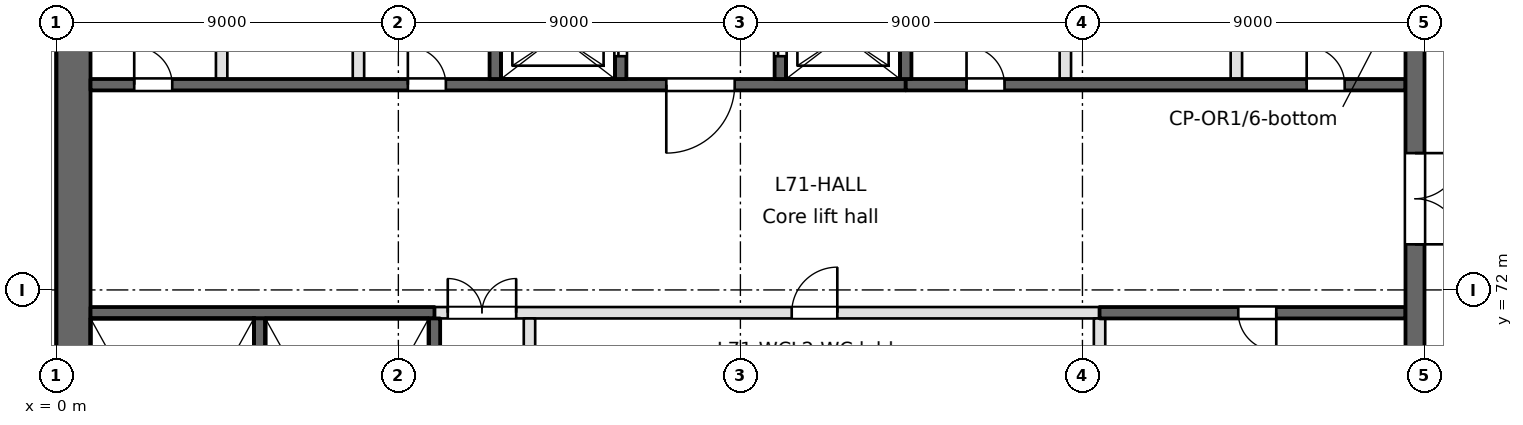
"""IFC4 building model, lengths in metres.
Left out: names, types, materials, properties, quantities, classifications, styles, units other than length and angle.
Written with IfcOpenShell. Run it as: python <this file> out.ifc"""

import sys

from ifc_helpers import new_model, si_unit, direction, frame, frame_2d, origin, place, context, subcontext, project, spatial, rectangle, extrude, element, fill, save


model = new_model("IFC4")
c1 = context("Model", 3, precision=1e-05, world=origin(), true_north=direction((0.0, 1.0)))
c2 = subcontext(c1, "Body", "Model", "MODEL_VIEW")
j1 = project(units=[si_unit("LENGTHUNIT", "METRE"), si_unit("PLANEANGLEUNIT", "RADIAN")], contexts=[c1])
p1 = place(None, origin())
s1 = spatial("IfcSite", under=j1, at=p1, CompositionType="ELEMENT")
p2 = place(p1, origin())
s2 = spatial("IfcBuilding", under=s1, at=p2, CompositionType="ELEMENT")
p3 = place(p2, frame((0.0, 0.0, 276.2)))
s3 = spatial("IfcBuildingStorey", under=s2, at=p3, CompositionType="ELEMENT", Elevation=276.2)
p4 = place(p3, frame((0.45, 94.5, 0.0), z_axis=(0.0, 0.0, 1.0), x_axis=(0.0, -1.0, 0.0)))
e1 = element("IfcWall", 1, at=p4, inside=s3, PredefinedType="SHEAR", context=c2, shape_type="SweptSolid", body=[
    extrude(rectangle(XDim=40.456, YDim=0.9, at=frame_2d((20.228, 0.0))), origin(), (0.0, 0.0, 1.0), 4.6),
])
p5 = place(p3, frame((0.9, 71.4, -0.45), z_axis=(0.0, 0.0, 1.0), x_axis=(1.0, 0.0, 0.0)))
e2 = element("IfcWall", 2, at=p5, inside=s3, PredefinedType="SOLIDWALL", context=c2, shape_type="SweptSolid", body=[
    extrude(rectangle(XDim=9.05, YDim=0.3, at=frame_2d((4.525, 0.0))), origin(), (0.0, 0.0, 1.0), 4.65),
])
p6 = place(p3, frame((9.95, 71.4, 0.0), z_axis=(0.0, 0.0, 1.0), x_axis=(1.0, 0.0, 0.0)))
e3 = element("IfcWall", 3, at=p6, inside=s3, PredefinedType="PARTITIONING", context=c2, shape_type="SweptSolid", body=[
    extrude(rectangle(XDim=17.5, YDim=0.3, at=frame_2d((8.75, 0.0))), origin(), (0.0, 0.0, 1.0), 4.2),
])
p7 = place(p6, frame((0.35, 0.0, 0.0)))
e4 = element("IfcOpeningElement", 4, at=p7, cuts=e3, PredefinedType="OPENING", context=c2, shape_type="SweptSolid", body=[
    extrude(rectangle(XDim=1.8, YDim=2.1, at=frame_2d((0.9, 1.05))), frame((0.0, 0.15, 0.0), z_axis=(0.0, -1.0, 0.0), x_axis=(1.0, 0.0, 0.0)), (0.0, 0.0, 1.0), 0.3),
])
p8 = place(p6, frame((9.4, 0.0, 0.0)))
e5 = element("IfcOpeningElement", 5, at=p8, cuts=e3, PredefinedType="OPENING", context=c2, shape_type="SweptSolid", body=[
    extrude(rectangle(XDim=1.2, YDim=2.1, at=frame_2d((0.6, 1.05))), frame((0.0, 0.15, 0.0), z_axis=(0.0, -1.0, 0.0), x_axis=(1.0, 0.0, 0.0)), (0.0, 0.0, 1.0), 0.3),
])
p9 = place(p3, frame((27.45, 71.4, 0.0), z_axis=(0.0, 0.0, 1.0), x_axis=(1.0, 0.0, 0.0)))
e6 = element("IfcWall", 6, at=p9, inside=s3, PredefinedType="SOLIDWALL", context=c2, shape_type="SweptSolid", body=[
    extrude(rectangle(XDim=8.05, YDim=0.3, at=frame_2d((4.025, 0.0))), origin(), (0.0, 0.0, 1.0), 4.2),
])
p10 = place(p9, frame((3.65, 0.0, 0.0)))
e7 = element("IfcOpeningElement", 7, at=p10, cuts=e6, PredefinedType="OPENING", context=c2, shape_type="SweptSolid", body=[
    extrude(rectangle(XDim=1.0, YDim=2.1, at=frame_2d((0.5, 1.05))), frame((0.0, 0.15, 0.0), z_axis=(0.0, -1.0, 0.0), x_axis=(1.0, 0.0, 0.0)), (0.0, 0.0, 1.0), 0.3),
])
p11 = place(p3, frame((0.9, 77.4, -0.45), z_axis=(0.0, 0.0, 1.0), x_axis=(1.0, 0.0, 0.0)))
e8 = element("IfcWall", 8, at=p11, inside=s3, PredefinedType="SOLIDWALL", context=c2, shape_type="SweptSolid", body=[
    extrude(rectangle(XDim=21.45, YDim=0.3, at=frame_2d((10.725, 0.0))), origin(), (0.0, 0.0, 1.0), 4.65),
])
p12 = place(p11, frame((15.15, 0.0, 0.45)))
e9 = element("IfcOpeningElement", 9, at=p12, cuts=e8, PredefinedType="OPENING", context=c2, shape_type="SweptSolid", body=[
    extrude(rectangle(XDim=1.8, YDim=2.1, at=frame_2d((0.9, 1.05))), frame((0.0, 0.15, 0.0), z_axis=(0.0, -1.0, 0.0), x_axis=(1.0, 0.0, 0.0)), (0.0, 0.0, 1.0), 0.3),
])
p13 = place(p11, frame((1.15, 0.0, 0.45)))
e10 = element("IfcOpeningElement", 10, at=p13, cuts=e8, PredefinedType="OPENING", context=c2, shape_type="SweptSolid", body=[
    extrude(rectangle(XDim=1.0, YDim=2.1, at=frame_2d((0.5, 1.05))), frame((0.0, 0.15, 0.0), z_axis=(0.0, -1.0, 0.0), x_axis=(1.0, 0.0, 0.0)), (0.0, 0.0, 1.0), 0.3),
])
p14 = place(p11, frame((8.35, 0.0, 0.45)))
e11 = element("IfcOpeningElement", 11, at=p14, cuts=e8, PredefinedType="OPENING", context=c2, shape_type="SweptSolid", body=[
    extrude(rectangle(XDim=1.0, YDim=2.1, at=frame_2d((0.5, 1.05))), frame((0.0, 0.15, 0.0), z_axis=(0.0, -1.0, 0.0), x_axis=(1.0, 0.0, 0.0)), (0.0, 0.0, 1.0), 0.3),
])
p15 = place(p3, frame((22.35, 77.4, 0.0), z_axis=(0.0, 0.0, 1.0), x_axis=(1.0, 0.0, 0.0)))
e12 = element("IfcWall", 12, at=p15, inside=s3, PredefinedType="SOLIDWALL", context=c2, shape_type="SweptSolid", body=[
    extrude(rectangle(XDim=13.15, YDim=0.3, at=frame_2d((6.575, 0.0))), origin(), (0.0, 0.0, 1.0), 4.2),
])
p16 = place(p15, frame((1.6, 0.0, 0.0)))
e13 = element("IfcOpeningElement", 13, at=p16, cuts=e12, PredefinedType="OPENING", context=c2, shape_type="SweptSolid", body=[
    extrude(rectangle(XDim=1.0, YDim=2.1, at=frame_2d((0.5, 1.05))), frame((0.0, 0.15, 0.0), z_axis=(0.0, -1.0, 0.0), x_axis=(1.0, 0.0, 0.0)), (0.0, 0.0, 1.0), 0.3),
])
p17 = place(p15, frame((10.55, 0.0, 0.0)))
e14 = element("IfcOpeningElement", 14, at=p17, cuts=e12, PredefinedType="OPENING", context=c2, shape_type="SweptSolid", body=[
    extrude(rectangle(XDim=1.0, YDim=2.1, at=frame_2d((0.5, 1.05))), frame((0.0, 0.15, 0.0), z_axis=(0.0, -1.0, 0.0), x_axis=(1.0, 0.0, 0.0)), (0.0, 0.0, 1.0), 0.3),
])
p18 = place(p3, frame((4.35, 77.55, 0.0), z_axis=(0.0, 0.0, 1.0), x_axis=(0.0, 1.0, 0.0)))
e15 = element("IfcWall", 15, at=p18, inside=s3, PredefinedType="PARTITIONING", context=c2, shape_type="SweptSolid", body=[
    extrude(rectangle(XDim=12.95, YDim=0.3, at=frame_2d((6.475, 0.0))), origin(), (0.0, 0.0, 1.0), 4.2),
])
p19 = place(p3, frame((5.35, 63.5, -0.45), z_axis=(0.0, 0.0, 1.0), x_axis=(0.0, 1.0, 0.0)))
e16 = element("IfcWall", 16, at=p19, inside=s3, PredefinedType="SOLIDWALL", context=c2, shape_type="SweptSolid", body=[
    extrude(rectangle(XDim=7.75, YDim=0.3, at=frame_2d((3.875, 0.0))), origin(), (0.0, 0.0, 1.0), 4.65),
])
p20 = place(p3, frame((7.95, 77.55, 0.0), z_axis=(0.0, 0.0, 1.0), x_axis=(0.0, 1.0, 0.0)))
e17 = element("IfcWall", 17, at=p20, inside=s3, PredefinedType="PARTITIONING", context=c2, shape_type="SweptSolid", body=[
    extrude(rectangle(XDim=12.95, YDim=0.3, at=frame_2d((6.475, 0.0))), origin(), (0.0, 0.0, 1.0), 4.2),
])
p21 = place(p3, frame((9.95, 63.5, -0.45), z_axis=(0.0, 0.0, 1.0), x_axis=(0.0, 1.0, 0.0)))
e18 = element("IfcWall", 18, at=p21, inside=s3, PredefinedType="SOLIDWALL", context=c2, shape_type="SweptSolid", body=[
    extrude(rectangle(XDim=7.75, YDim=0.3, at=frame_2d((3.875, 0.0))), origin(), (0.0, 0.0, 1.0), 4.65),
])
p22 = place(p3, frame((11.55, 77.55, -0.45), z_axis=(0.0, 0.0, 1.0), x_axis=(0.0, 1.0, 0.0)))
e19 = element("IfcWall", 19, at=p22, inside=s3, PredefinedType="SOLIDWALL", context=c2, shape_type="SweptSolid", body=[
    extrude(rectangle(XDim=10.1, YDim=0.3, at=frame_2d((5.05, 0.0))), origin(), (0.0, 0.0, 1.0), 4.65),
])
p23 = place(p3, frame((12.45, 63.5, 0.0), z_axis=(0.0, 0.0, 1.0), x_axis=(0.0, 1.0, 0.0)))
e20 = element("IfcWall", 20, at=p23, inside=s3, PredefinedType="PARTITIONING", context=c2, shape_type="SweptSolid", body=[
    extrude(rectangle(XDim=7.75, YDim=0.3, at=frame_2d((3.875, 0.0))), origin(), (0.0, 0.0, 1.0), 4.2),
])
p24 = place(p3, frame((14.85, 77.55, -0.45), z_axis=(0.0, 0.0, 1.0), x_axis=(0.0, 1.0, 0.0)))
e21 = element("IfcWall", 21, at=p24, inside=s3, PredefinedType="SOLIDWALL", context=c2, shape_type="SweptSolid", body=[
    extrude(rectangle(XDim=10.1, YDim=0.3, at=frame_2d((5.05, 0.0))), origin(), (0.0, 0.0, 1.0), 4.65),
])
p25 = place(p24, frame((0.6, 0.0, 0.45)))
e22 = element("IfcOpeningElement", 22, at=p25, cuts=e21, PredefinedType="OPENING", context=c2, shape_type="SweptSolid", body=[
    extrude(rectangle(XDim=1.1, YDim=2.1, at=frame_2d((0.55, 1.05))), frame((0.0, 0.15, 0.0), z_axis=(0.0, -1.0, 0.0), x_axis=(1.0, 0.0, 0.0)), (0.0, 0.0, 1.0), 0.3),
])
p26 = place(p24, frame((3.2, 0.0, 0.45)))
e23 = element("IfcOpeningElement", 23, at=p26, cuts=e21, PredefinedType="OPENING", context=c2, shape_type="SweptSolid", body=[
    extrude(rectangle(XDim=1.1, YDim=2.1, at=frame_2d((0.55, 1.05))), frame((0.0, 0.15, 0.0), z_axis=(0.0, -1.0, 0.0), x_axis=(1.0, 0.0, 0.0)), (0.0, 0.0, 1.0), 0.3),
])
p27 = place(p24, frame((5.8, 0.0, 0.45)))
e24 = element("IfcOpeningElement", 24, at=p27, cuts=e21, PredefinedType="OPENING", context=c2, shape_type="SweptSolid", body=[
    extrude(rectangle(XDim=1.1, YDim=2.1, at=frame_2d((0.55, 1.05))), frame((0.0, 0.15, 0.0), z_axis=(0.0, -1.0, 0.0), x_axis=(1.0, 0.0, 0.0)), (0.0, 0.0, 1.0), 0.3),
])
p28 = place(p24, frame((8.4, 0.0, 0.45)))
e25 = element("IfcOpeningElement", 25, at=p28, cuts=e21, PredefinedType="OPENING", context=c2, shape_type="SweptSolid", body=[
    extrude(rectangle(XDim=1.1, YDim=2.1, at=frame_2d((0.55, 1.05))), frame((0.0, 0.15, 0.0), z_axis=(0.0, -1.0, 0.0), x_axis=(1.0, 0.0, 0.0)), (0.0, 0.0, 1.0), 0.3),
])
p29 = place(p3, frame((19.05, 77.55, -0.45), z_axis=(0.0, 0.0, 1.0), x_axis=(0.0, 1.0, 0.0)))
e26 = element("IfcWall", 26, at=p29, inside=s3, PredefinedType="SOLIDWALL", context=c2, shape_type="SweptSolid", body=[
    extrude(rectangle(XDim=10.1, YDim=0.3, at=frame_2d((5.05, 0.0))), origin(), (0.0, 0.0, 1.0), 4.65),
])
p30 = place(p29, frame((0.6, 0.0, 0.45)))
e27 = element("IfcOpeningElement", 27, at=p30, cuts=e26, PredefinedType="OPENING", context=c2, shape_type="SweptSolid", body=[
    extrude(rectangle(XDim=1.1, YDim=2.1, at=frame_2d((0.55, 1.05))), frame((0.0, 0.15, 0.0), z_axis=(0.0, -1.0, 0.0), x_axis=(1.0, 0.0, 0.0)), (0.0, 0.0, 1.0), 0.3),
])
p31 = place(p29, frame((3.2, 0.0, 0.45)))
e28 = element("IfcOpeningElement", 28, at=p31, cuts=e26, PredefinedType="OPENING", context=c2, shape_type="SweptSolid", body=[
    extrude(rectangle(XDim=1.1, YDim=2.1, at=frame_2d((0.55, 1.05))), frame((0.0, 0.15, 0.0), z_axis=(0.0, -1.0, 0.0), x_axis=(1.0, 0.0, 0.0)), (0.0, 0.0, 1.0), 0.3),
])
p32 = place(p29, frame((5.8, 0.0, 0.45)))
e29 = element("IfcOpeningElement", 29, at=p32, cuts=e26, PredefinedType="OPENING", context=c2, shape_type="SweptSolid", body=[
    extrude(rectangle(XDim=1.1, YDim=2.1, at=frame_2d((0.55, 1.05))), frame((0.0, 0.15, 0.0), z_axis=(0.0, -1.0, 0.0), x_axis=(1.0, 0.0, 0.0)), (0.0, 0.0, 1.0), 0.3),
])
p33 = place(p29, frame((8.4, 0.0, 0.45)))
e30 = element("IfcOpeningElement", 30, at=p33, cuts=e26, PredefinedType="OPENING", context=c2, shape_type="SweptSolid", body=[
    extrude(rectangle(XDim=1.1, YDim=2.1, at=frame_2d((0.55, 1.05))), frame((0.0, 0.15, 0.0), z_axis=(0.0, -1.0, 0.0), x_axis=(1.0, 0.0, 0.0)), (0.0, 0.0, 1.0), 0.3),
])
p34 = place(p3, frame((22.35, 77.55, -0.45), z_axis=(0.0, 0.0, 1.0), x_axis=(0.0, 1.0, 0.0)))
e31 = element("IfcWall", 31, at=p34, inside=s3, PredefinedType="SOLIDWALL", context=c2, shape_type="SweptSolid", body=[
    extrude(rectangle(XDim=10.1, YDim=0.3, at=frame_2d((5.05, 0.0))), origin(), (0.0, 0.0, 1.0), 4.65),
])
p35 = place(p3, frame((26.55, 77.55, 0.0), z_axis=(0.0, 0.0, 1.0), x_axis=(0.0, 1.0, 0.0)))
e32 = element("IfcWall", 32, at=p35, inside=s3, PredefinedType="PARTITIONING", context=c2, shape_type="SweptSolid", body=[
    extrude(rectangle(XDim=12.95, YDim=0.3, at=frame_2d((6.475, 0.0))), origin(), (0.0, 0.0, 1.0), 4.2),
])
p36 = place(p3, frame((27.45, 68.05, 0.0), z_axis=(0.0, 0.0, 1.0), x_axis=(0.0, 1.0, 0.0)))
e33 = element("IfcWall", 33, at=p36, inside=s3, PredefinedType="PARTITIONING", context=c2, shape_type="SweptSolid", body=[
    extrude(rectangle(XDim=3.2, YDim=0.3, at=frame_2d((1.6, 0.0))), origin(), (0.0, 0.0, 1.0), 4.2),
])
p37 = place(p3, frame((31.05, 77.55, 0.0), z_axis=(0.0, 0.0, 1.0), x_axis=(0.0, 1.0, 0.0)))
e34 = element("IfcWall", 34, at=p37, inside=s3, PredefinedType="PARTITIONING", context=c2, shape_type="SweptSolid", body=[
    extrude(rectangle(XDim=12.95, YDim=0.3, at=frame_2d((6.475, 0.0))), origin(), (0.0, 0.0, 1.0), 4.2),
])
p38 = place(p3, frame((35.75, 63.5, -0.45), z_axis=(0.0, 0.0, 1.0), x_axis=(0.0, 1.0, 0.0)))
e35 = element("IfcWall", 35, at=p38, inside=s3, PredefinedType="SOLIDWALL", context=c2, shape_type="SweptSolid", body=[
    extrude(rectangle(XDim=34.6, YDim=0.5, at=frame_2d((17.3, 0.0))), origin(), (0.0, 0.0, 1.0), 4.65),
])
p39 = place(p38, frame((9.7, 0.0, 0.45)))
e36 = element("IfcOpeningElement", 36, at=p39, cuts=e35, PredefinedType="OPENING", context=c2, shape_type="SweptSolid", body=[
    extrude(rectangle(XDim=2.4, YDim=2.1, at=frame_2d((1.2, 1.05))), frame((0.0, 0.25, 0.0), z_axis=(0.0, -1.0, 0.0), x_axis=(1.0, 0.0, 0.0)), (0.0, 0.0, 1.0), 0.5),
])
p40 = place(p38, frame((27.9, 0.0, 0.45)))
e37 = element("IfcOpeningElement", 37, at=p40, cuts=e35, PredefinedType="OPENING", context=c2, shape_type="SweptSolid", body=[
    extrude(rectangle(XDim=1.5, YDim=2.1, at=frame_2d((0.75, 1.05))), frame((0.0, 0.25, 0.0), z_axis=(0.0, -1.0, 0.0), x_axis=(1.0, 0.0, 0.0)), (0.0, 0.0, 1.0), 0.5),
])
p41 = place(p38, frame((1.5, 0.0, 0.45)))
e38 = element("IfcOpeningElement", 38, at=p41, cuts=e35, PredefinedType="OPENING", context=c2, shape_type="SweptSolid", body=[
    extrude(rectangle(XDim=1.2, YDim=2.1, at=frame_2d((0.6, 1.05))), frame((0.0, 0.25, 0.0), z_axis=(0.0, -1.0, 0.0), x_axis=(1.0, 0.0, 0.0)), (0.0, 0.0, 1.0), 0.5),
])
p42 = place(p25, origin())
e39 = element("IfcDoor", 39, at=p42, inside=s3, OperationType="SLIDING_TO_RIGHT", PredefinedType="DOOR", context=c2, shape_type="SweptSolid", body=[
    extrude(rectangle(XDim=1.1, YDim=2.1, at=frame_2d((0.55, 1.05))), frame((0.0, 0.025, 0.0), z_axis=(0.0, -1.0, 0.0), x_axis=(1.0, 0.0, 0.0)), (0.0, 0.0, 1.0), 0.05),
])
fill(e22, e39)
p43 = place(p30, origin())
e40 = element("IfcDoor", 40, at=p43, inside=s3, OperationType="SLIDING_TO_RIGHT", PredefinedType="DOOR", context=c2, shape_type="SweptSolid", body=[
    extrude(rectangle(XDim=1.1, YDim=2.1, at=frame_2d((0.55, 1.05))), frame((0.0, 0.025, 0.0), z_axis=(0.0, -1.0, 0.0), x_axis=(1.0, 0.0, 0.0)), (0.0, 0.0, 1.0), 0.05),
])
fill(e27, e40)
p44 = place(p12, frame((1.8, 0.0, 0.0), z_axis=(0.0, 0.0, 1.0), x_axis=(-1.0, 0.0, 0.0)))
e41 = element("IfcDoor", 41, at=p44, inside=s3, OperationType="SINGLE_SWING_RIGHT", PredefinedType="DOOR", context=c2, shape_type="SweptSolid", body=[
    extrude(rectangle(XDim=1.8, YDim=2.1, at=frame_2d((0.9, 1.05))), frame((0.0, 0.025, 0.0), z_axis=(0.0, -1.0, 0.0), x_axis=(1.0, 0.0, 0.0)), (0.0, 0.0, 1.0), 0.05),
])
fill(e9, e41)
p45 = place(p39, frame((2.4, 0.0, 0.0), z_axis=(0.0, 0.0, 1.0), x_axis=(-1.0, 0.0, 0.0)))
e42 = element("IfcDoor", 42, at=p45, inside=s3, OperationType="DOUBLE_DOOR_SINGLE_SWING", PredefinedType="DOOR", context=c2, shape_type="SweptSolid", body=[
    extrude(rectangle(XDim=2.4, YDim=2.1, at=frame_2d((1.2, 1.05))), frame((0.0, 0.025, 0.0), z_axis=(0.0, -1.0, 0.0), x_axis=(1.0, 0.0, 0.0)), (0.0, 0.0, 1.0), 0.05),
])
fill(e36, e42)
p46 = place(p7, origin())
e43 = element("IfcDoor", 43, at=p46, inside=s3, OperationType="DOUBLE_DOOR_SINGLE_SWING", PredefinedType="DOOR", context=c2, shape_type="SweptSolid", body=[
    extrude(rectangle(XDim=1.8, YDim=2.1, at=frame_2d((0.9, 1.05))), frame((0.0, 0.025, 0.0), z_axis=(0.0, -1.0, 0.0), x_axis=(1.0, 0.0, 0.0)), (0.0, 0.0, 1.0), 0.05),
])
fill(e4, e43)
p47 = place(p8, origin())
e44 = element("IfcDoor", 44, at=p47, inside=s3, OperationType="SINGLE_SWING_RIGHT", PredefinedType="DOOR", context=c2, shape_type="SweptSolid", body=[
    extrude(rectangle(XDim=1.2, YDim=2.1, at=frame_2d((0.6, 1.05))), frame((0.0, 0.025, 0.0), z_axis=(0.0, -1.0, 0.0), x_axis=(1.0, 0.0, 0.0)), (0.0, 0.0, 1.0), 0.05),
])
fill(e5, e44)
p48 = place(p10, frame((1.0, 0.0, 0.0), z_axis=(0.0, 0.0, 1.0), x_axis=(-1.0, 0.0, 0.0)))
e45 = element("IfcDoor", 45, at=p48, inside=s3, OperationType="SINGLE_SWING_LEFT", PredefinedType="DOOR", context=c2, shape_type="SweptSolid", body=[
    extrude(rectangle(XDim=1.0, YDim=2.1, at=frame_2d((0.5, 1.05))), frame((0.0, 0.025, 0.0), z_axis=(0.0, -1.0, 0.0), x_axis=(1.0, 0.0, 0.0)), (0.0, 0.0, 1.0), 0.05),
])
fill(e7, e45)
p49 = place(p13, origin())
e46 = element("IfcDoor", 46, at=p49, inside=s3, OperationType="SINGLE_SWING_LEFT", PredefinedType="DOOR", context=c2, shape_type="SweptSolid", body=[
    extrude(rectangle(XDim=1.0, YDim=2.1, at=frame_2d((0.5, 1.05))), frame((0.0, 0.025, 0.0), z_axis=(0.0, -1.0, 0.0), x_axis=(1.0, 0.0, 0.0)), (0.0, 0.0, 1.0), 0.05),
])
fill(e10, e46)
p50 = place(p14, origin())
e47 = element("IfcDoor", 47, at=p50, inside=s3, OperationType="SINGLE_SWING_LEFT", PredefinedType="DOOR", context=c2, shape_type="SweptSolid", body=[
    extrude(rectangle(XDim=1.0, YDim=2.1, at=frame_2d((0.5, 1.05))), frame((0.0, 0.025, 0.0), z_axis=(0.0, -1.0, 0.0), x_axis=(1.0, 0.0, 0.0)), (0.0, 0.0, 1.0), 0.05),
])
fill(e11, e47)
p51 = place(p16, origin())
e48 = element("IfcDoor", 48, at=p51, inside=s3, OperationType="SINGLE_SWING_LEFT", PredefinedType="DOOR", context=c2, shape_type="SweptSolid", body=[
    extrude(rectangle(XDim=1.0, YDim=2.1, at=frame_2d((0.5, 1.05))), frame((0.0, 0.025, 0.0), z_axis=(0.0, -1.0, 0.0), x_axis=(1.0, 0.0, 0.0)), (0.0, 0.0, 1.0), 0.05),
])
fill(e13, e48)
p52 = place(p17, origin())
e49 = element("IfcDoor", 49, at=p52, inside=s3, OperationType="SINGLE_SWING_LEFT", PredefinedType="DOOR", context=c2, shape_type="SweptSolid", body=[
    extrude(rectangle(XDim=1.0, YDim=2.1, at=frame_2d((0.5, 1.05))), frame((0.0, 0.025, 0.0), z_axis=(0.0, -1.0, 0.0), x_axis=(1.0, 0.0, 0.0)), (0.0, 0.0, 1.0), 0.05),
])
fill(e14, e49)
save(model, sys.argv[1])
